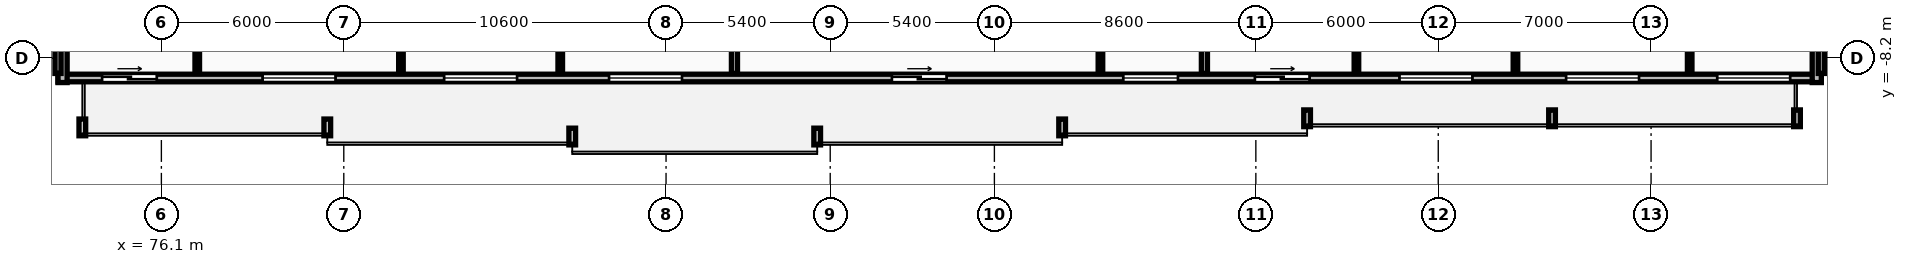
"""IFC4 building model, lengths in metres.
Left out: names, types, materials, properties, quantities, classifications, styles, units other than length and angle.
Written with IfcOpenShell. Run it as: python <this file> out.ifc"""

import sys

from ifc_helpers import new_model, si_unit, direction, frame, frame_2d, origin, place, context, subcontext, project, spatial, rectangle, extrude, element, fill, save


model = new_model("IFC4")
c1 = context("Model", 3, precision=1e-05, world=origin(), true_north=direction((0.0, 1.0)))
c2 = subcontext(c1, "Body", "Model", "MODEL_VIEW")
j1 = project(units=[si_unit("LENGTHUNIT", "METRE"), si_unit("PLANEANGLEUNIT", "RADIAN")], contexts=[c1])
p1 = place(None, origin())
s1 = spatial("IfcSite", under=j1, at=p1, CompositionType="ELEMENT")
p2 = place(p1, origin())
s2 = spatial("IfcBuilding", under=s1, at=p2, CompositionType="ELEMENT")
p3 = place(p2, frame((0.0, 0.0, 142.9)))
s3 = spatial("IfcBuildingStorey", under=s2, at=p3, CompositionType="ELEMENT", Elevation=142.9)
p4 = place(p3, frame((72.7, -8.85, 0.0), z_axis=(0.0, 0.0, 1.0), x_axis=(1.0, 0.0, 0.0)))
e1 = element("IfcWall", 1, at=p4, inside=s3, PredefinedType="STANDARD", context=c2, shape_type="SweptSolid", body=[
    extrude(rectangle(XDim=58.0, YDim=0.25, at=frame_2d((29.0, 0.0))), origin(), (0.0, 0.0, 1.0), 3.31),
])
p5 = place(p4, frame((6.73, 0.0, 0.85)))
e2 = element("IfcOpeningElement", 2, at=p5, cuts=e1, PredefinedType="OPENING", context=c2, shape_type="SweptSolid", body=[
    extrude(rectangle(XDim=2.4, YDim=1.9, at=frame_2d((1.2, 0.95))), frame((0.0, 0.135, 0.0), z_axis=(0.0, -1.0, 0.0), x_axis=(1.0, 0.0, 0.0)), (0.0, 0.0, 1.0), 0.27),
])
p6 = place(p4, frame((12.7, 0.0, 0.85)))
e3 = element("IfcOpeningElement", 3, at=p6, cuts=e1, PredefinedType="OPENING", context=c2, shape_type="SweptSolid", body=[
    extrude(rectangle(XDim=2.4, YDim=1.9, at=frame_2d((1.2, 0.95))), frame((0.0, 0.135, 0.0), z_axis=(0.0, -1.0, 0.0), x_axis=(1.0, 0.0, 0.0)), (0.0, 0.0, 1.0), 0.27),
])
p7 = place(p4, frame((1.45, 0.0, 0.0)))
e4 = element("IfcOpeningElement", 4, at=p7, cuts=e1, PredefinedType="OPENING", context=c2, shape_type="SweptSolid", body=[
    extrude(rectangle(XDim=1.8, YDim=2.2, at=frame_2d((0.9, 1.1))), frame((0.0, 0.135, 0.0), z_axis=(0.0, -1.0, 0.0), x_axis=(1.0, 0.0, 0.0)), (0.0, 0.0, 1.0), 0.27),
])
p8 = place(p4, frame((18.125, 0.0, 0.85)))
e5 = element("IfcOpeningElement", 5, at=p8, cuts=e1, PredefinedType="OPENING", context=c2, shape_type="SweptSolid", body=[
    extrude(rectangle(XDim=2.4, YDim=1.9, at=frame_2d((1.2, 0.95))), frame((0.0, 0.135, 0.0), z_axis=(0.0, -1.0, 0.0), x_axis=(1.0, 0.0, 0.0)), (0.0, 0.0, 1.0), 0.27),
])
p9 = place(p4, frame((27.429, 0.0, 0.0)))
e6 = element("IfcOpeningElement", 6, at=p9, cuts=e1, PredefinedType="OPENING", context=c2, shape_type="SweptSolid", body=[
    extrude(rectangle(XDim=1.8, YDim=2.2, at=frame_2d((0.9, 1.1))), frame((0.0, 0.135, 0.0), z_axis=(0.0, -1.0, 0.0), x_axis=(1.0, 0.0, 0.0)), (0.0, 0.0, 1.0), 0.27),
])
p10 = place(p4, frame((35.038, 0.0, 0.85)))
e7 = element("IfcOpeningElement", 7, at=p10, cuts=e1, PredefinedType="OPENING", context=c2, shape_type="SweptSolid", body=[
    extrude(rectangle(XDim=1.8, YDim=1.8, at=frame_2d((0.9, 0.9))), frame((0.0, 0.135, 0.0), z_axis=(0.0, -1.0, 0.0), x_axis=(1.0, 0.0, 0.0)), (0.0, 0.0, 1.0), 0.27),
])
p11 = place(p4, frame((44.124, 0.0, 0.85)))
e8 = element("IfcOpeningElement", 8, at=p11, cuts=e1, PredefinedType="OPENING", context=c2, shape_type="SweptSolid", body=[
    extrude(rectangle(XDim=2.4, YDim=1.9, at=frame_2d((1.2, 0.95))), frame((0.0, 0.135, 0.0), z_axis=(0.0, -1.0, 0.0), x_axis=(1.0, 0.0, 0.0)), (0.0, 0.0, 1.0), 0.27),
])
p12 = place(p4, frame((49.604, 0.0, 0.85)))
e9 = element("IfcOpeningElement", 9, at=p12, cuts=e1, PredefinedType="OPENING", context=c2, shape_type="SweptSolid", body=[
    extrude(rectangle(XDim=2.4, YDim=1.9, at=frame_2d((1.2, 0.95))), frame((0.0, 0.135, 0.0), z_axis=(0.0, -1.0, 0.0), x_axis=(1.0, 0.0, 0.0)), (0.0, 0.0, 1.0), 0.27),
])
p13 = place(p4, frame((39.368, 0.0, 0.0)))
e10 = element("IfcOpeningElement", 10, at=p13, cuts=e1, PredefinedType="OPENING", context=c2, shape_type="SweptSolid", body=[
    extrude(rectangle(XDim=1.8, YDim=2.2, at=frame_2d((0.9, 1.1))), frame((0.0, 0.135, 0.0), z_axis=(0.0, -1.0, 0.0), x_axis=(1.0, 0.0, 0.0)), (0.0, 0.0, 1.0), 0.27),
])
p14 = place(p4, frame((54.575, 0.0, 0.85)))
e11 = element("IfcOpeningElement", 11, at=p14, cuts=e1, PredefinedType="OPENING", context=c2, shape_type="SweptSolid", body=[
    extrude(rectangle(XDim=2.4, YDim=1.9, at=frame_2d((1.2, 0.95))), frame((0.0, 0.135, 0.0), z_axis=(0.0, -1.0, 0.0), x_axis=(1.0, 0.0, 0.0)), (0.0, 0.0, 1.0), 0.27),
])
for number, where, z_axis, x_axis in (
    (12, (130.55, -9.0, 0.0), (0.0, 0.0, 1.0), (0.0, 1.0, 0.0)),
    (13, (72.85, -5.4, 0.0), (0.0, 0.0, 1.0), (0.0, -1.0, 0.0)),
):
    element("IfcWall", number, at=place(p3, frame(where, z_axis=z_axis, x_axis=x_axis)), inside=s3, PredefinedType="STANDARD", context=c2, shape_type="SweptSolid", body=[
        extrude(rectangle(XDim=3.6, YDim=0.3, at=frame_2d((1.8, 0.0))), origin(), (0.0, 0.0, 1.0), 3.31),
    ])
for number, where, z_axis, x_axis in (
    (14, (72.7, -8.7, 0.0), (0.0, 0.0, 1.0), (0.0, 1.0, 0.0)),
    (15, (130.7, -8.7, 0.0), (0.0, 0.0, 1.0), (0.0, 1.0, 0.0)),
    (16, (94.95, -8.7, 0.0), (0.0, 0.0, 1.0), (0.0, 1.0, 0.0)),
):
    element("IfcWall", number, at=place(p3, frame(where, z_axis=z_axis, x_axis=x_axis)), inside=s3, PredefinedType="PARTITIONING", context=c2, shape_type="SweptSolid", body=[
        extrude(rectangle(XDim=24.57, YDim=0.2, at=frame_2d((12.285, 0.0))), origin(), (0.0, 0.0, 1.0), 3.31),
    ])
p15 = place(p3, frame((83.98, -8.7, 0.0), z_axis=(0.0, 0.0, 1.0), x_axis=(0.0, 1.0, 0.0)))
e17 = element("IfcWall", 17, at=p15, inside=s3, PredefinedType="PARTITIONING", context=c2, shape_type="SweptSolid", body=[
    extrude(rectangle(XDim=4.82, YDim=0.15, at=frame_2d((2.41, 0.0))), origin(), (0.0, 0.0, 1.0), 3.31),
])
p16 = place(p3, frame((77.28, -8.7, 0.0), z_axis=(0.0, 0.0, 1.0), x_axis=(0.0, 1.0, 0.0)))
e18 = element("IfcWall", 18, at=p16, inside=s3, PredefinedType="PARTITIONING", context=c2, shape_type="SweptSolid", body=[
    extrude(rectangle(XDim=9.96, YDim=0.15, at=frame_2d((4.98, 0.0))), origin(), (0.0, 0.0, 1.0), 3.31),
])
p17 = place(p16, frame((5.22, 0.0, 0.0)))
e19 = element("IfcOpeningElement", 19, at=p17, cuts=e18, PredefinedType="OPENING", context=c2, shape_type="SweptSolid", body=[
    extrude(rectangle(XDim=0.92, YDim=2.08, at=frame_2d((0.46, 1.04))), frame((0.0, 0.085, 0.0), z_axis=(0.0, -1.0, 0.0), x_axis=(1.0, 0.0, 0.0)), (0.0, 0.0, 1.0), 0.17),
])
p18 = place(p3, frame((89.22, -8.7, 0.0), z_axis=(0.0, 0.0, 1.0), x_axis=(0.0, 1.0, 0.0)))
e20 = element("IfcWall", 20, at=p18, inside=s3, PredefinedType="PARTITIONING", context=c2, shape_type="SweptSolid", body=[
    extrude(rectangle(XDim=7.34, YDim=0.15, at=frame_2d((3.67, 0.0))), origin(), (0.0, 0.0, 1.0), 3.31),
])
p19 = place(p18, frame((5.897, 0.0, 0.0)))
e21 = element("IfcOpeningElement", 21, at=p19, cuts=e20, PredefinedType="OPENING", context=c2, shape_type="SweptSolid", body=[
    extrude(rectangle(XDim=0.92, YDim=2.08, at=frame_2d((0.46, 1.04))), frame((0.0, 0.085, 0.0), z_axis=(0.0, -1.0, 0.0), x_axis=(1.0, 0.0, 0.0)), (0.0, 0.0, 1.0), 0.17),
])
p20 = place(p3, frame((110.408, -8.7, 0.0), z_axis=(0.0, 0.0, 1.0), x_axis=(0.0, 1.0, 0.0)))
e22 = element("IfcWall", 22, at=p20, inside=s3, PredefinedType="PARTITIONING", context=c2, shape_type="SweptSolid", body=[
    extrude(rectangle(XDim=24.57, YDim=0.2, at=frame_2d((12.285, 0.0))), origin(), (0.0, 0.0, 1.0), 3.31),
])
p21 = place(p3, frame((106.988, -8.7, 0.0), z_axis=(0.0, 0.0, 1.0), x_axis=(0.0, 1.0, 0.0)))
e23 = element("IfcWall", 23, at=p21, inside=s3, PredefinedType="PARTITIONING", context=c2, shape_type="SweptSolid", body=[
    extrude(rectangle(XDim=9.96, YDim=0.15, at=frame_2d((4.98, 0.0))), origin(), (0.0, 0.0, 1.0), 3.31),
])
p22 = place(p21, frame((5.894, 0.0, 0.0)))
e24 = element("IfcOpeningElement", 24, at=p22, cuts=e23, PredefinedType="OPENING", context=c2, shape_type="SweptSolid", body=[
    extrude(rectangle(XDim=0.84, YDim=2.04, at=frame_2d((0.42, 1.02))), frame((0.0, 0.085, 0.0), z_axis=(0.0, -1.0, 0.0), x_axis=(1.0, 0.0, 0.0)), (0.0, 0.0, 1.0), 0.17),
])
p23 = place(p21, frame((7.69, 0.0, 0.0)))
e25 = element("IfcOpeningElement", 25, at=p23, cuts=e23, PredefinedType="OPENING", context=c2, shape_type="SweptSolid", body=[
    extrude(rectangle(XDim=0.84, YDim=2.04, at=frame_2d((0.42, 1.02))), frame((0.0, 0.085, 0.0), z_axis=(0.0, -1.0, 0.0), x_axis=(1.0, 0.0, 0.0)), (0.0, 0.0, 1.0), 0.17),
])
p24 = place(p21, frame((2.223, 0.0, 0.0)))
e26 = element("IfcOpeningElement", 26, at=p24, cuts=e23, PredefinedType="OPENING", context=c2, shape_type="SweptSolid", body=[
    extrude(rectangle(XDim=0.88, YDim=2.06, at=frame_2d((0.44, 1.03))), frame((0.0, 0.085, 0.0), z_axis=(0.0, -1.0, 0.0), x_axis=(1.0, 0.0, 0.0)), (0.0, 0.0, 1.0), 0.17),
])
p25 = place(p3, frame((120.639, -8.7, 0.0), z_axis=(0.0, 0.0, 1.0), x_axis=(0.0, 1.0, 0.0)))
e27 = element("IfcWall", 27, at=p25, inside=s3, PredefinedType="PARTITIONING", context=c2, shape_type="SweptSolid", body=[
    extrude(rectangle(XDim=4.82, YDim=0.15, at=frame_2d((2.41, 0.0))), origin(), (0.0, 0.0, 1.0), 3.31),
])
p26 = place(p3, frame((115.408, -8.7, 0.0), z_axis=(0.0, 0.0, 1.0), x_axis=(0.0, 1.0, 0.0)))
e28 = element("IfcWall", 28, at=p26, inside=s3, PredefinedType="PARTITIONING", context=c2, shape_type="SweptSolid", body=[
    extrude(rectangle(XDim=9.96, YDim=0.15, at=frame_2d((4.98, 0.0))), origin(), (0.0, 0.0, 1.0), 3.31),
])
p27 = place(p26, frame((5.22, 0.0, 0.0)))
e29 = element("IfcOpeningElement", 29, at=p27, cuts=e28, PredefinedType="OPENING", context=c2, shape_type="SweptSolid", body=[
    extrude(rectangle(XDim=0.92, YDim=2.08, at=frame_2d((0.46, 1.04))), frame((0.0, 0.085, 0.0), z_axis=(0.0, -1.0, 0.0), x_axis=(1.0, 0.0, 0.0)), (0.0, 0.0, 1.0), 0.17),
])
p28 = place(p3, frame((126.37, -8.7, 0.0), z_axis=(0.0, 0.0, 1.0), x_axis=(0.0, 1.0, 0.0)))
e30 = element("IfcWall", 30, at=p28, inside=s3, PredefinedType="PARTITIONING", context=c2, shape_type="SweptSolid", body=[
    extrude(rectangle(XDim=7.23, YDim=0.15, at=frame_2d((3.615, 0.0))), origin(), (0.0, 0.0, 1.0), 3.31),
])
p29 = place(p28, frame((5.22, 0.0, 0.0)))
e31 = element("IfcOpeningElement", 31, at=p29, cuts=e30, PredefinedType="OPENING", context=c2, shape_type="SweptSolid", body=[
    extrude(rectangle(XDim=0.92, YDim=2.08, at=frame_2d((0.46, 1.04))), frame((0.0, 0.085, 0.0), z_axis=(0.0, -1.0, 0.0), x_axis=(1.0, 0.0, 0.0)), (0.0, 0.0, 1.0), 0.17),
])
p30 = place(p5, origin())
e32 = element("IfcWindow", 32, at=p30, inside=s3, PartitioningType="DOUBLE_PANEL_VERTICAL", PredefinedType="WINDOW", context=c2, shape_type="SweptSolid", body=[
    extrude(rectangle(XDim=2.4, YDim=1.9, at=frame_2d((1.2, 0.95))), frame((0.0, 0.03, 0.0), z_axis=(0.0, -1.0, 0.0), x_axis=(1.0, 0.0, 0.0)), (0.0, 0.0, 1.0), 0.06),
])
fill(e2, e32)
p31 = place(p6, origin())
e33 = element("IfcWindow", 33, at=p31, inside=s3, PartitioningType="DOUBLE_PANEL_VERTICAL", PredefinedType="WINDOW", context=c2, shape_type="SweptSolid", body=[
    extrude(rectangle(XDim=2.4, YDim=1.9, at=frame_2d((1.2, 0.95))), frame((0.0, 0.03, 0.0), z_axis=(0.0, -1.0, 0.0), x_axis=(1.0, 0.0, 0.0)), (0.0, 0.0, 1.0), 0.06),
])
fill(e3, e33)
p32 = place(p7, origin())
e34 = element("IfcDoor", 34, at=p32, inside=s3, OperationType="SLIDING_TO_RIGHT", PredefinedType="DOOR", context=c2, shape_type="SweptSolid", body=[
    extrude(rectangle(XDim=1.8, YDim=2.2, at=frame_2d((0.9, 1.1))), frame((0.0, 0.025, 0.0), z_axis=(0.0, -1.0, 0.0), x_axis=(1.0, 0.0, 0.0)), (0.0, 0.0, 1.0), 0.05),
])
fill(e4, e34)
p33 = place(p8, origin())
e35 = element("IfcWindow", 35, at=p33, inside=s3, PartitioningType="DOUBLE_PANEL_VERTICAL", PredefinedType="WINDOW", context=c2, shape_type="SweptSolid", body=[
    extrude(rectangle(XDim=2.4, YDim=1.9, at=frame_2d((1.2, 0.95))), frame((0.0, 0.03, 0.0), z_axis=(0.0, -1.0, 0.0), x_axis=(1.0, 0.0, 0.0)), (0.0, 0.0, 1.0), 0.06),
])
fill(e5, e35)
p34 = place(p9, origin())
e36 = element("IfcDoor", 36, at=p34, inside=s3, OperationType="SLIDING_TO_RIGHT", PredefinedType="DOOR", context=c2, shape_type="SweptSolid", body=[
    extrude(rectangle(XDim=1.8, YDim=2.2, at=frame_2d((0.9, 1.1))), frame((0.0, 0.025, 0.0), z_axis=(0.0, -1.0, 0.0), x_axis=(1.0, 0.0, 0.0)), (0.0, 0.0, 1.0), 0.05),
])
fill(e6, e36)
p35 = place(p10, origin())
e37 = element("IfcWindow", 37, at=p35, inside=s3, PartitioningType="SINGLE_PANEL", PredefinedType="WINDOW", context=c2, shape_type="SweptSolid", body=[
    extrude(rectangle(XDim=1.8, YDim=1.8, at=frame_2d((0.9, 0.9))), frame((0.0, 0.03, 0.0), z_axis=(0.0, -1.0, 0.0), x_axis=(1.0, 0.0, 0.0)), (0.0, 0.0, 1.0), 0.06),
])
fill(e7, e37)
p36 = place(p11, origin())
e38 = element("IfcWindow", 38, at=p36, inside=s3, PartitioningType="DOUBLE_PANEL_VERTICAL", PredefinedType="WINDOW", context=c2, shape_type="SweptSolid", body=[
    extrude(rectangle(XDim=2.4, YDim=1.9, at=frame_2d((1.2, 0.95))), frame((0.0, 0.03, 0.0), z_axis=(0.0, -1.0, 0.0), x_axis=(1.0, 0.0, 0.0)), (0.0, 0.0, 1.0), 0.06),
])
fill(e8, e38)
p37 = place(p12, origin())
e39 = element("IfcWindow", 39, at=p37, inside=s3, PartitioningType="DOUBLE_PANEL_VERTICAL", PredefinedType="WINDOW", context=c2, shape_type="SweptSolid", body=[
    extrude(rectangle(XDim=2.4, YDim=1.9, at=frame_2d((1.2, 0.95))), frame((0.0, 0.03, 0.0), z_axis=(0.0, -1.0, 0.0), x_axis=(1.0, 0.0, 0.0)), (0.0, 0.0, 1.0), 0.06),
])
fill(e9, e39)
p38 = place(p13, origin())
e40 = element("IfcDoor", 40, at=p38, inside=s3, OperationType="SLIDING_TO_RIGHT", PredefinedType="DOOR", context=c2, shape_type="SweptSolid", body=[
    extrude(rectangle(XDim=1.8, YDim=2.2, at=frame_2d((0.9, 1.1))), frame((0.0, 0.025, 0.0), z_axis=(0.0, -1.0, 0.0), x_axis=(1.0, 0.0, 0.0)), (0.0, 0.0, 1.0), 0.05),
])
fill(e10, e40)
p39 = place(p14, origin())
e41 = element("IfcWindow", 41, at=p39, inside=s3, PartitioningType="DOUBLE_PANEL_VERTICAL", PredefinedType="WINDOW", context=c2, shape_type="SweptSolid", body=[
    extrude(rectangle(XDim=2.4, YDim=1.9, at=frame_2d((1.2, 0.95))), frame((0.0, 0.03, 0.0), z_axis=(0.0, -1.0, 0.0), x_axis=(1.0, 0.0, 0.0)), (0.0, 0.0, 1.0), 0.06),
])
fill(e11, e41)
save(model, sys.argv[1])
